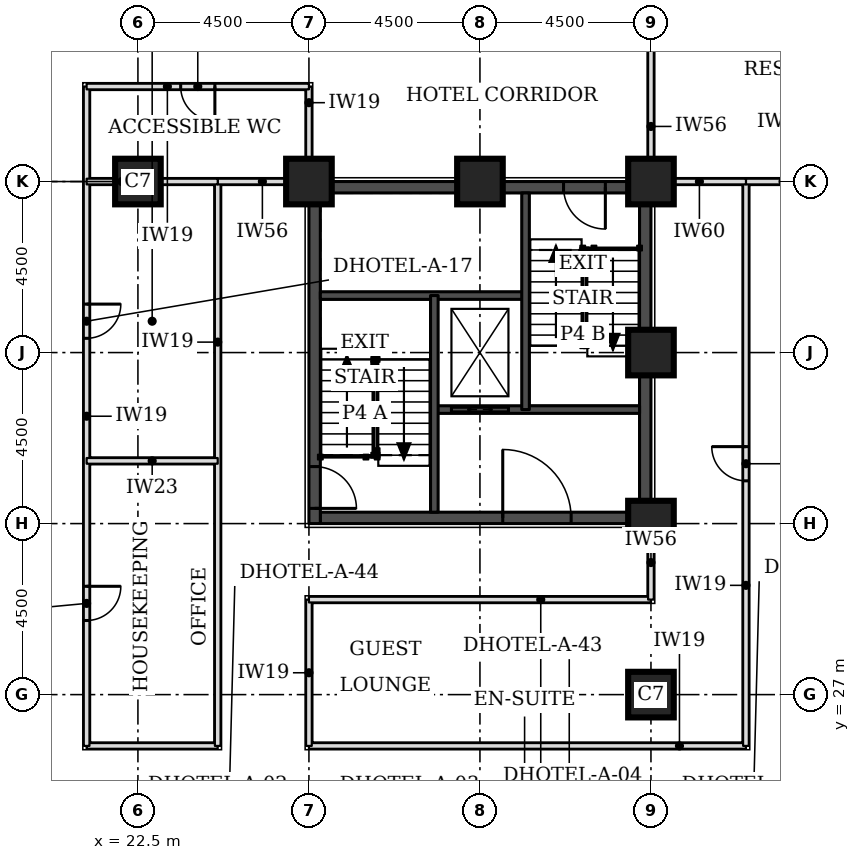
"""IFC4 building model, lengths in metres.
Left out: names, types, materials, properties, quantities, classifications, styles, units other than length and angle.
Written with IfcOpenShell. Run it as: python <this file> out.ifc"""

import sys

from ifc_helpers import new_model, si_unit, direction, frame, frame_2d, origin, origin_2d, place, context, subcontext, project, spatial, rectangle, extrude, element, fill, save


model = new_model("IFC4")
c1 = context("Model", 3, precision=1e-05, world=origin(), true_north=direction((0.0, 1.0)))
c2 = subcontext(c1, "Body", "Model", "MODEL_VIEW")
j1 = project(units=[si_unit("LENGTHUNIT", "METRE"), si_unit("PLANEANGLEUNIT", "RADIAN")], contexts=[c1])
p1 = place(None, origin())
s1 = spatial("IfcSite", under=j1, at=p1, CompositionType="ELEMENT")
p2 = place(p1, origin())
s2 = spatial("IfcBuilding", under=s1, at=p2, CompositionType="ELEMENT")
p3 = place(p2, frame((0.0, 0.0, 26.4)))
s3 = spatial("IfcBuildingStorey", under=s2, at=p3, CompositionType="ELEMENT", Elevation=26.4)
for number, where, z_axis, x_axis in (
    (1, (36.0, 27.0, 0.0), (0.0, 0.0, 1.0), (1.0, 0.0, 0.0)),
    (2, (36.0, 31.5, 0.0), (0.0, 0.0, 1.0), (1.0, 0.0, 0.0)),
    (3, (36.0, 36.0, 0.0), (0.0, 0.0, 1.0), (1.0, 0.0, 0.0)),
    (4, (22.5, 40.5, 0.0), (0.0, 0.0, 1.0), (1.0, 0.0, 0.0)),
    (5, (27.0, 40.5, 0.0), (0.0, 0.0, 1.0), (1.0, 0.0, 0.0)),
    (6, (31.5, 40.5, 0.0), (0.0, 0.0, 1.0), (1.0, 0.0, 0.0)),
    (7, (36.0, 40.5, 0.0), (0.0, 0.0, 1.0), (1.0, 0.0, 0.0)),
):
    element("IfcColumn", number, at=place(p3, frame(where, z_axis=z_axis, x_axis=x_axis)), inside=s3, PredefinedType="COLUMN", context=c2, shape_type="SweptSolid", body=[
        extrude(rectangle(XDim=1.2, YDim=1.2, at=origin_2d()), origin(), (0.0, 0.0, 1.0), 3.3),
    ])
p4 = place(p3, frame((27.3, 31.65, 0.0), z_axis=(0.0, 0.0, 1.0), x_axis=(1.0, 0.0, 0.0)))
e8 = element("IfcWall", 8, at=p4, inside=s3, PredefinedType="SHEAR", context=c2, shape_type="SweptSolid", body=[
    extrude(rectangle(XDim=8.4, YDim=0.3, at=frame_2d((4.2, 0.0))), origin(), (0.0, 0.0, 1.0), 3.3),
])
p5 = place(p4, frame((4.8, 0.0, 0.0)))
e9 = element("IfcOpeningElement", 9, at=p5, cuts=e8, PredefinedType="OPENING", context=c2, shape_type="SweptSolid", body=[
    extrude(rectangle(XDim=1.8, YDim=2.1, at=frame_2d((0.9, 1.05))), frame((0.0, 0.16, 0.0), z_axis=(0.0, -1.0, 0.0), x_axis=(1.0, 0.0, 0.0)), (0.0, 0.0, 1.0), 0.32),
])
p6 = place(p3, frame((27.3, 40.35, 0.0), z_axis=(0.0, 0.0, 1.0), x_axis=(1.0, 0.0, 0.0)))
e10 = element("IfcWall", 10, at=p6, inside=s3, PredefinedType="SHEAR", context=c2, shape_type="SweptSolid", body=[
    extrude(rectangle(XDim=8.4, YDim=0.3, at=frame_2d((4.2, 0.0))), origin(), (0.0, 0.0, 1.0), 3.3),
])
p7 = place(p6, frame((6.4, 0.0, 0.0)))
e11 = element("IfcOpeningElement", 11, at=p7, cuts=e10, PredefinedType="OPENING", context=c2, shape_type="SweptSolid", body=[
    extrude(rectangle(XDim=1.1, YDim=2.1, at=frame_2d((0.55, 1.05))), frame((0.0, 0.16, 0.0), z_axis=(0.0, -1.0, 0.0), x_axis=(1.0, 0.0, 0.0)), (0.0, 0.0, 1.0), 0.32),
])
p8 = place(p3, frame((27.15, 31.5, 0.0), z_axis=(0.0, 0.0, 1.0), x_axis=(0.0, 1.0, 0.0)))
e12 = element("IfcWall", 12, at=p8, inside=s3, PredefinedType="SHEAR", context=c2, shape_type="SweptSolid", body=[
    extrude(rectangle(XDim=9.0, YDim=0.3, at=frame_2d((4.5, 0.0))), origin(), (0.0, 0.0, 1.0), 3.3),
])
p9 = place(p8, frame((0.4, 0.0, 0.0)))
e13 = element("IfcOpeningElement", 13, at=p9, cuts=e12, PredefinedType="OPENING", context=c2, shape_type="SweptSolid", body=[
    extrude(rectangle(XDim=1.1, YDim=2.1, at=frame_2d((0.55, 1.05))), frame((0.0, 0.16, 0.0), z_axis=(0.0, -1.0, 0.0), x_axis=(1.0, 0.0, 0.0)), (0.0, 0.0, 1.0), 0.32),
])
p10 = place(p3, frame((35.85, 31.5, 0.0), z_axis=(0.0, 0.0, 1.0), x_axis=(0.0, 1.0, 0.0)))
e14 = element("IfcWall", 14, at=p10, inside=s3, PredefinedType="SHEAR", context=c2, shape_type="SweptSolid", body=[
    extrude(rectangle(XDim=9.0, YDim=0.3, at=frame_2d((4.5, 0.0))), origin(), (0.0, 0.0, 1.0), 3.3),
])
p11 = place(p3, frame((21.15, 25.65, 0.0), z_axis=(0.0, 0.0, 1.0), x_axis=(1.0, 0.0, 0.0)))
e15 = element("IfcWall", 15, at=p11, inside=s3, PredefinedType="PARTITIONING", context=c2, shape_type="SweptSolid", body=[
    extrude(rectangle(XDim=3.45, YDim=0.15, at=frame_2d((1.725, 0.0))), origin(), (0.0, 0.0, 1.0), 3.08),
])
p12 = place(p3, frame((21.15, 25.65, 0.0), z_axis=(0.0, 0.0, 1.0), x_axis=(0.0, 1.0, 0.0)))
e16 = element("IfcWall", 16, at=p12, inside=s3, PredefinedType="PARTITIONING", context=c2, shape_type="SweptSolid", body=[
    extrude(rectangle(XDim=17.35, YDim=0.15, at=frame_2d((8.675, 0.0))), origin(), (0.0, 0.0, 1.0), 3.08),
])
p13 = place(p12, frame((3.3, 0.0, 0.0)))
e17 = element("IfcOpeningElement", 17, at=p13, cuts=e16, PredefinedType="OPENING", context=c2, shape_type="SweptSolid", body=[
    extrude(rectangle(XDim=0.9, YDim=2.1, at=frame_2d((0.45, 1.05))), frame((0.0, 0.085, 0.0), z_axis=(0.0, -1.0, 0.0), x_axis=(1.0, 0.0, 0.0)), (0.0, 0.0, 1.0), 0.17),
])
p14 = place(p12, frame((10.725, 0.0, 0.0)))
e18 = element("IfcOpeningElement", 18, at=p14, cuts=e16, PredefinedType="OPENING", context=c2, shape_type="SweptSolid", body=[
    extrude(rectangle(XDim=0.9, YDim=2.1, at=frame_2d((0.45, 1.05))), frame((0.0, 0.085, 0.0), z_axis=(0.0, -1.0, 0.0), x_axis=(1.0, 0.0, 0.0)), (0.0, 0.0, 1.0), 0.17),
])
p15 = place(p3, frame((24.6, 25.65, 0.0), z_axis=(0.0, 0.0, 1.0), x_axis=(0.0, 1.0, 0.0)))
e19 = element("IfcWall", 19, at=p15, inside=s3, PredefinedType="PARTITIONING", context=c2, shape_type="SweptSolid", body=[
    extrude(rectangle(XDim=14.85, YDim=0.15, at=frame_2d((7.425, 0.0))), origin(), (0.0, 0.0, 1.0), 3.08),
])
p16 = place(p3, frame((27.0, 25.65, 0.0), z_axis=(0.0, 0.0, 1.0), x_axis=(1.0, 0.0, 0.0)))
e20 = element("IfcWall", 20, at=p16, inside=s3, PredefinedType="PARTITIONING", context=c2, shape_type="SweptSolid", body=[
    extrude(rectangle(XDim=11.5, YDim=0.15, at=frame_2d((5.75, 0.0))), origin(), (0.0, 0.0, 1.0), 3.08),
])
p17 = place(p3, frame((27.0, 25.65, 0.0), z_axis=(0.0, 0.0, 1.0), x_axis=(0.0, 1.0, 0.0)))
e21 = element("IfcWall", 21, at=p17, inside=s3, PredefinedType="PARTITIONING", context=c2, shape_type="SweptSolid", body=[
    extrude(rectangle(XDim=3.85, YDim=0.15, at=frame_2d((1.925, 0.0))), origin(), (0.0, 0.0, 1.0), 3.08),
])
p18 = place(p3, frame((38.5, 25.65, 0.0), z_axis=(0.0, 0.0, 1.0), x_axis=(0.0, 1.0, 0.0)))
e22 = element("IfcWall", 22, at=p18, inside=s3, PredefinedType="PARTITIONING", context=c2, shape_type="SweptSolid", body=[
    extrude(rectangle(XDim=14.85, YDim=0.15, at=frame_2d((7.425, 0.0))), origin(), (0.0, 0.0, 1.0), 3.08),
])
p19 = place(p18, frame((6.975, 0.0, 0.0)))
e23 = element("IfcOpeningElement", 23, at=p19, cuts=e22, PredefinedType="OPENING", context=c2, shape_type="SweptSolid", body=[
    extrude(rectangle(XDim=0.9, YDim=2.1, at=frame_2d((0.45, 1.05))), frame((0.0, 0.085, 0.0), z_axis=(0.0, -1.0, 0.0), x_axis=(1.0, 0.0, 0.0)), (0.0, 0.0, 1.0), 0.17),
])
p20 = place(p3, frame((27.0, 29.5, 0.0), z_axis=(0.0, 0.0, 1.0), x_axis=(1.0, 0.0, 0.0)))
e24 = element("IfcWall", 24, at=p20, inside=s3, PredefinedType="PARTITIONING", context=c2, shape_type="SweptSolid", body=[
    extrude(rectangle(XDim=9.0, YDim=0.15, at=frame_2d((4.5, 0.0))), origin(), (0.0, 0.0, 1.0), 3.08),
])
p21 = place(p3, frame((36.0, 29.5, 0.0), z_axis=(0.0, 0.0, 1.0), x_axis=(0.0, 1.0, 0.0)))
e25 = element("IfcWall", 25, at=p21, inside=s3, PredefinedType="PARTITIONING", context=c2, shape_type="SweptSolid", body=[
    extrude(rectangle(XDim=1.95, YDim=0.15, at=frame_2d((0.975, 0.0))), origin(), (0.0, 0.0, 1.0), 2.33),
])
p22 = place(p3, frame((24.6, 40.5, 0.0), z_axis=(0.0, 0.0, 1.0), x_axis=(1.0, 0.0, 0.0)))
e26 = element("IfcWall", 26, at=p22, inside=s3, PredefinedType="PARTITIONING", context=c2, shape_type="SweptSolid", body=[
    extrude(rectangle(XDim=2.35, YDim=0.15, at=frame_2d((1.175, 0.0))), origin(), (0.0, 0.0, 1.0), 2.33),
])
p23 = place(p3, frame((38.5, 40.5, 0.0), z_axis=(0.0, 0.0, 1.0), x_axis=(1.0, 0.0, 0.0)))
e27 = element("IfcWall", 27, at=p23, inside=s3, PredefinedType="PARTITIONING", context=c2, shape_type="SweptSolid", body=[
    extrude(rectangle(XDim=1.95, YDim=0.15, at=frame_2d((0.975, 0.0))), origin(), (0.0, 0.0, 1.0), 2.33),
])
p24 = place(p3, frame((27.0, 40.55, 0.0), z_axis=(0.0, 0.0, 1.0), x_axis=(0.0, 1.0, 0.0)))
e28 = element("IfcWall", 28, at=p24, inside=s3, PredefinedType="PARTITIONING", context=c2, shape_type="SweptSolid", body=[
    extrude(rectangle(XDim=2.45, YDim=0.15, at=frame_2d((1.225, 0.0))), origin(), (0.0, 0.0, 1.0), 3.08),
])
p25 = place(p3, frame((36.0, 40.55, 0.0), z_axis=(0.0, 0.0, 1.0), x_axis=(0.0, 1.0, 0.0)))
e29 = element("IfcWall", 29, at=p25, inside=s3, PredefinedType="PARTITIONING", context=c2, shape_type="SweptSolid", body=[
    extrude(rectangle(XDim=4.4, YDim=0.15, at=frame_2d((2.2, 0.0))), origin(), (0.0, 0.0, 1.0), 2.33),
])
p26 = place(p3, frame((21.15, 43.0, 0.0), z_axis=(0.0, 0.0, 1.0), x_axis=(1.0, 0.0, 0.0)))
e30 = element("IfcWall", 30, at=p26, inside=s3, PredefinedType="PARTITIONING", context=c2, shape_type="SweptSolid", body=[
    extrude(rectangle(XDim=5.85, YDim=0.15, at=frame_2d((2.925, 0.0))), origin(), (0.0, 0.0, 1.0), 3.08),
])
p27 = place(p26, frame((2.475, 0.0, 0.0)))
e31 = element("IfcOpeningElement", 31, at=p27, cuts=e30, PredefinedType="OPENING", context=c2, shape_type="SweptSolid", body=[
    extrude(rectangle(XDim=0.9, YDim=2.1, at=frame_2d((0.45, 1.05))), frame((0.0, 0.085, 0.0), z_axis=(0.0, -1.0, 0.0), x_axis=(1.0, 0.0, 0.0)), (0.0, 0.0, 1.0), 0.17),
])
p28 = place(p3, frame((21.15, 33.15, 0.0), z_axis=(0.0, 0.0, 1.0), x_axis=(1.0, 0.0, 0.0)))
e32 = element("IfcWall", 32, at=p28, inside=s3, PredefinedType="PARTITIONING", context=c2, shape_type="SweptSolid", body=[
    extrude(rectangle(XDim=3.45, YDim=0.15, at=frame_2d((1.725, 0.0))), origin(), (0.0, 0.0, 1.0), 3.08),
])
p29 = place(p3, frame((21.15, 40.5, 0.0), z_axis=(0.0, 0.0, 1.0), x_axis=(1.0, 0.0, 0.0)))
e33 = element("IfcWall", 33, at=p29, inside=s3, PredefinedType="PARTITIONING", context=c2, shape_type="SweptSolid", body=[
    extrude(rectangle(XDim=3.45, YDim=0.15, at=frame_2d((1.725, 0.0))), origin(), (0.0, 0.0, 1.0), 2.33),
])
p30 = place(p3, frame((36.05, 40.5, 0.0), z_axis=(0.0, 0.0, 1.0), x_axis=(1.0, 0.0, 0.0)))
e34 = element("IfcWall", 34, at=p30, inside=s3, PredefinedType="PARTITIONING", context=c2, shape_type="SweptSolid", body=[
    extrude(rectangle(XDim=2.45, YDim=0.15, at=frame_2d((1.225, 0.0))), origin(), (0.0, 0.0, 1.0), 2.33),
])
p31 = place(p3, frame((30.3, 34.5, 0.0), z_axis=(0.0, 0.0, 1.0), x_axis=(1.0, 0.0, 0.0)))
e35 = element("IfcWall", 35, at=p31, inside=s3, PredefinedType="SOLIDWALL", context=c2, shape_type="SweptSolid", body=[
    extrude(rectangle(XDim=5.4, YDim=0.2, at=frame_2d((2.7, 0.0))), origin(), (0.0, 0.0, 1.0), 3.08),
])
p32 = place(p31, frame((0.45, 0.0, 0.0)))
e36 = element("IfcOpeningElement", 36, at=p32, cuts=e35, PredefinedType="OPENING", context=c2, shape_type="SweptSolid", body=[
    extrude(rectangle(XDim=1.5, YDim=2.1, at=frame_2d((0.75, 1.05))), frame((0.0, 0.11, 0.0), z_axis=(0.0, -1.0, 0.0), x_axis=(1.0, 0.0, 0.0)), (0.0, 0.0, 1.0), 0.22),
])
p33 = place(p3, frame((27.3, 37.5, 0.0), z_axis=(0.0, 0.0, 1.0), x_axis=(1.0, 0.0, 0.0)))
e37 = element("IfcWall", 37, at=p33, inside=s3, PredefinedType="SOLIDWALL", context=c2, shape_type="SweptSolid", body=[
    extrude(rectangle(XDim=5.4, YDim=0.2, at=frame_2d((2.7, 0.0))), origin(), (0.0, 0.0, 1.0), 3.08),
])
for number, where, z_axis, x_axis in (
    (38, (30.3, 31.8, 0.0), (0.0, 0.0, 1.0), (0.0, 1.0, 0.0)),
    (39, (32.7, 34.5, 0.0), (0.0, 0.0, 1.0), (0.0, 1.0, 0.0)),
):
    element("IfcWall", number, at=place(p3, frame(where, z_axis=z_axis, x_axis=x_axis)), inside=s3, PredefinedType="SOLIDWALL", context=c2, shape_type="SweptSolid", body=[
        extrude(rectangle(XDim=5.7, YDim=0.2, at=frame_2d((2.85, 0.0))), origin(), (0.0, 0.0, 1.0), 3.08),
    ])
p34 = place(p19, origin())
e40 = element("IfcDoor", 40, at=p34, inside=s3, OperationType="SINGLE_SWING_RIGHT", PredefinedType="DOOR", context=c2, shape_type="SweptSolid", body=[
    extrude(rectangle(XDim=0.9, YDim=2.1, at=frame_2d((0.45, 1.05))), frame((0.0, 0.025, 0.0), z_axis=(0.0, -1.0, 0.0), x_axis=(1.0, 0.0, 0.0)), (0.0, 0.0, 1.0), 0.05),
])
fill(e23, e40)
p35 = place(p13, frame((0.9, 0.0, 0.0), z_axis=(0.0, 0.0, 1.0), x_axis=(-1.0, 0.0, 0.0)))
e41 = element("IfcDoor", 41, at=p35, inside=s3, OperationType="SINGLE_SWING_LEFT", PredefinedType="DOOR", context=c2, shape_type="SweptSolid", body=[
    extrude(rectangle(XDim=0.9, YDim=2.1, at=frame_2d((0.45, 1.05))), frame((0.0, 0.025, 0.0), z_axis=(0.0, -1.0, 0.0), x_axis=(1.0, 0.0, 0.0)), (0.0, 0.0, 1.0), 0.05),
])
fill(e17, e41)
p36 = place(p14, frame((0.9, 0.0, 0.0), z_axis=(0.0, 0.0, 1.0), x_axis=(-1.0, 0.0, 0.0)))
e42 = element("IfcDoor", 42, at=p36, inside=s3, OperationType="SINGLE_SWING_LEFT", PredefinedType="DOOR", context=c2, shape_type="SweptSolid", body=[
    extrude(rectangle(XDim=0.9, YDim=2.1, at=frame_2d((0.45, 1.05))), frame((0.0, 0.025, 0.0), z_axis=(0.0, -1.0, 0.0), x_axis=(1.0, 0.0, 0.0)), (0.0, 0.0, 1.0), 0.05),
])
fill(e18, e42)
p37 = place(p27, frame((0.9, 0.0, 0.0), z_axis=(0.0, 0.0, 1.0), x_axis=(-1.0, 0.0, 0.0)))
e43 = element("IfcDoor", 43, at=p37, inside=s3, OperationType="SINGLE_SWING_LEFT", PredefinedType="DOOR", context=c2, shape_type="SweptSolid", body=[
    extrude(rectangle(XDim=0.9, YDim=2.1, at=frame_2d((0.45, 1.05))), frame((0.0, 0.025, 0.0), z_axis=(0.0, -1.0, 0.0), x_axis=(1.0, 0.0, 0.0)), (0.0, 0.0, 1.0), 0.05),
])
fill(e31, e43)
p38 = place(p9, frame((1.1, 0.0, 0.0), z_axis=(0.0, 0.0, 1.0), x_axis=(-1.0, 0.0, 0.0)))
e44 = element("IfcDoor", 44, at=p38, inside=s3, OperationType="SINGLE_SWING_RIGHT", PredefinedType="DOOR", context=c2, shape_type="SweptSolid", body=[
    extrude(rectangle(XDim=1.1, YDim=2.1, at=frame_2d((0.55, 1.05))), frame((0.0, 0.025, 0.0), z_axis=(0.0, -1.0, 0.0), x_axis=(1.0, 0.0, 0.0)), (0.0, 0.0, 1.0), 0.05),
])
fill(e13, e44)
p39 = place(p7, frame((1.1, 0.0, 0.0), z_axis=(0.0, 0.0, 1.0), x_axis=(-1.0, 0.0, 0.0)))
e45 = element("IfcDoor", 45, at=p39, inside=s3, OperationType="SINGLE_SWING_LEFT", PredefinedType="DOOR", context=c2, shape_type="SweptSolid", body=[
    extrude(rectangle(XDim=1.1, YDim=2.1, at=frame_2d((0.55, 1.05))), frame((0.0, 0.025, 0.0), z_axis=(0.0, -1.0, 0.0), x_axis=(1.0, 0.0, 0.0)), (0.0, 0.0, 1.0), 0.05),
])
fill(e11, e45)
p40 = place(p32, origin())
e46 = element("IfcDoor", 46, at=p40, inside=s3, OperationType="DOUBLE_DOOR_SLIDING", PredefinedType="DOOR", context=c2, shape_type="SweptSolid", body=[
    extrude(rectangle(XDim=1.5, YDim=2.1, at=frame_2d((0.75, 1.05))), frame((0.0, 0.025, 0.0), z_axis=(0.0, -1.0, 0.0), x_axis=(1.0, 0.0, 0.0)), (0.0, 0.0, 1.0), 0.05),
])
fill(e36, e46)
p41 = place(p5, origin())
e47 = element("IfcDoor", 47, at=p41, inside=s3, OperationType="SINGLE_SWING_LEFT", PredefinedType="DOOR", context=c2, shape_type="SweptSolid", body=[
    extrude(rectangle(XDim=1.8, YDim=2.1, at=frame_2d((0.9, 1.05))), frame((0.0, 0.025, 0.0), z_axis=(0.0, -1.0, 0.0), x_axis=(1.0, 0.0, 0.0)), (0.0, 0.0, 1.0), 0.05),
])
fill(e9, e47)
save(model, sys.argv[1])
